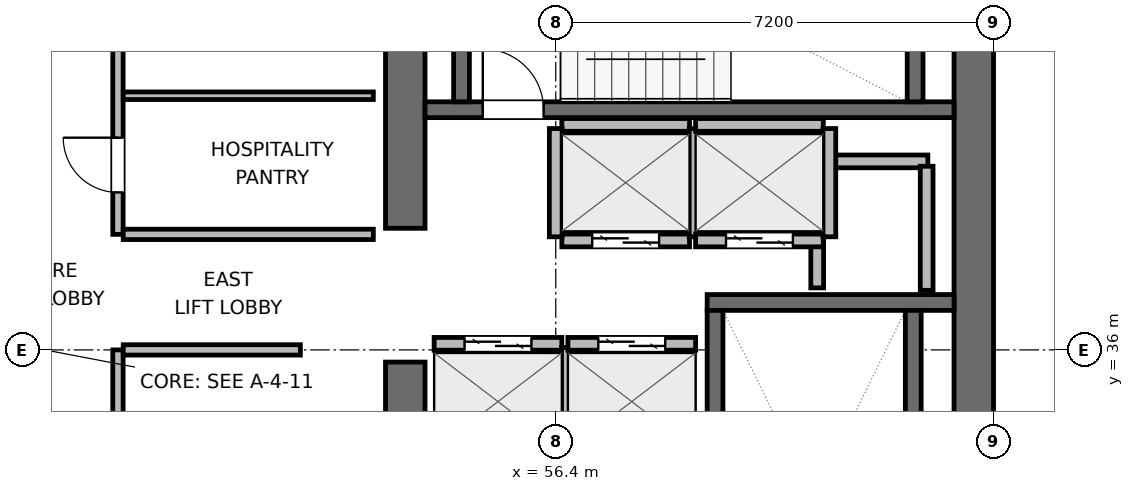
"""IFC4 building model, lengths in metres.
Left out: names, types, materials, properties, quantities, classifications, styles, units other than length and angle.
Written with IfcOpenShell. Run it as: python <this file> out.ifc"""

import sys

from ifc_helpers import new_model, si_unit, direction, frame, frame_2d, origin, place, context, subcontext, project, spatial, rectangle, extrude, element, fill, save


model = new_model("IFC4")
c1 = context("Model", 3, precision=1e-05, world=origin(), true_north=direction((0.0, 1.0)))
c2 = subcontext(c1, "Body", "Model", "MODEL_VIEW")
j1 = project(units=[si_unit("LENGTHUNIT", "METRE"), si_unit("PLANEANGLEUNIT", "RADIAN")], contexts=[c1])
p1 = place(None, origin())
s1 = spatial("IfcSite", under=j1, at=p1, CompositionType="ELEMENT")
p2 = place(p1, origin())
s2 = spatial("IfcBuilding", under=s1, at=p2, CompositionType="ELEMENT")
p3 = place(p2, frame((0.0, 0.0, 223.2)))
s3 = spatial("IfcBuildingStorey", under=s2, at=p3, CompositionType="ELEMENT", Elevation=223.2)
p4 = place(p3, frame((53.925, 27.925, 0.0), z_axis=(0.0, 0.0, 1.0), x_axis=(0.0, 1.0, 0.0)))
e1 = element("IfcWall", 1, at=p4, inside=s3, PredefinedType="SHEAR", context=c2, shape_type="SweptSolid", body=[
    extrude(rectangle(XDim=7.875, YDim=0.65, at=frame_2d((3.938, 0.0))), origin(), (0.0, 0.0, 1.0), 3.9),
])
p5 = place(p3, frame((53.925, 38.0, 0.0), z_axis=(0.0, 0.0, 1.0), x_axis=(0.0, 1.0, 0.0)))
e2 = element("IfcWall", 2, at=p5, inside=s3, PredefinedType="SHEAR", context=c2, shape_type="SweptSolid", body=[
    extrude(rectangle(XDim=6.075, YDim=0.65, at=frame_2d((3.038, 0.0))), origin(), (0.0, 0.0, 1.0), 3.9),
])
p6 = place(p3, frame((63.275, 27.6, 0.0), z_axis=(0.0, 0.0, 1.0), x_axis=(0.0, 1.0, 0.0)))
e3 = element("IfcWall", 3, at=p6, inside=s3, PredefinedType="SHEAR", context=c2, shape_type="SweptSolid", body=[
    extrude(rectangle(XDim=16.8, YDim=0.65, at=frame_2d((8.4, 0.0))), origin(), (0.0, 0.0, 1.0), 3.9),
])
p7 = place(p3, frame((58.89, 36.78, 0.0), z_axis=(0.0, 0.0, 1.0), x_axis=(1.0, 0.0, 0.0)))
e4 = element("IfcWall", 4, at=p7, inside=s3, PredefinedType="SHEAR", context=c2, shape_type="SweptSolid", body=[
    extrude(rectangle(XDim=4.06, YDim=0.26, at=frame_2d((2.03, 0.0))), origin(), (0.0, 0.0, 1.0), 3.9),
])
p8 = place(p3, frame((59.02, 29.05, 0.0), z_axis=(0.0, 0.0, 1.0), x_axis=(0.0, 1.0, 0.0)))
e5 = element("IfcWall", 5, at=p8, inside=s3, PredefinedType="SHEAR", context=c2, shape_type="SweptSolid", body=[
    extrude(rectangle(XDim=7.6, YDim=0.26, at=frame_2d((3.8, 0.0))), origin(), (0.0, 0.0, 1.0), 3.9),
])
p9 = place(p8, frame((0.3, 0.0, 0.0)))
e6 = element("IfcOpeningElement", 6, at=p9, cuts=e5, PredefinedType="OPENING", context=c2, shape_type="SweptSolid", body=[
    extrude(rectangle(XDim=1.0, YDim=2.04, at=frame_2d((0.5, 1.02))), frame((0.0, 0.14, 0.0), z_axis=(0.0, -1.0, 0.0), x_axis=(1.0, 0.0, 0.0)), (0.0, 0.0, 1.0), 0.28),
])
p10 = place(p3, frame((62.28, 29.05, 0.0), z_axis=(0.0, 0.0, 1.0), x_axis=(0.0, 1.0, 0.0)))
e7 = element("IfcWall", 7, at=p10, inside=s3, PredefinedType="SHEAR", context=c2, shape_type="SweptSolid", body=[
    extrude(rectangle(XDim=7.6, YDim=0.26, at=frame_2d((3.8, 0.0))), origin(), (0.0, 0.0, 1.0), 3.9),
])
p11 = place(p3, frame((54.25, 39.95, 0.0), z_axis=(0.0, 0.0, 1.0), x_axis=(1.0, 0.0, 0.0)))
e8 = element("IfcWall", 8, at=p11, inside=s3, PredefinedType="SHEAR", context=c2, shape_type="SweptSolid", body=[
    extrude(rectangle(XDim=8.7, YDim=0.26, at=frame_2d((4.35, 0.0))), origin(), (0.0, 0.0, 1.0), 3.9),
])
p12 = place(p11, frame((0.95, 0.0, 0.0)))
e9 = element("IfcOpeningElement", 9, at=p12, cuts=e8, PredefinedType="OPENING", context=c2, shape_type="SweptSolid", body=[
    extrude(rectangle(XDim=1.0, YDim=2.04, at=frame_2d((0.5, 1.02))), frame((0.0, 0.14, 0.0), z_axis=(0.0, -1.0, 0.0), x_axis=(1.0, 0.0, 0.0)), (0.0, 0.0, 1.0), 0.28),
])
for number, where, z_axis, x_axis in (
    (10, (54.85, 40.08, 0.0), (0.0, 0.0, 1.0), (0.0, 1.0, 0.0)),
    (11, (62.31, 40.08, 0.0), (0.0, 0.0, 1.0), (0.0, 1.0, 0.0)),
):
    element("IfcWall", number, at=place(p3, frame(where, z_axis=z_axis, x_axis=x_axis)), inside=s3, PredefinedType="SHEAR", context=c2, shape_type="SweptSolid", body=[
        extrude(rectangle(XDim=2.94, YDim=0.26, at=frame_2d((1.47, 0.0))), origin(), (0.0, 0.0, 1.0), 3.9),
    ])
p13 = place(p3, frame((60.72, 39.1, 0.0), z_axis=(0.0, 0.0, 1.0), x_axis=(1.0, 0.0, 0.0)))
e12 = element("IfcWall", 12, at=p13, inside=s3, PredefinedType="PARTITIONING", context=c2, shape_type="SweptSolid", body=[
    extrude(rectangle(XDim=1.8, YDim=0.21, at=frame_2d((0.9, 0.0))), origin(), (0.0, 0.0, 1.0), 3.68),
])
p14 = place(p3, frame((60.7, 37.02, 0.0), z_axis=(0.0, 0.0, 1.0), x_axis=(0.0, 1.0, 0.0)))
e13 = element("IfcWall", 13, at=p14, inside=s3, PredefinedType="PARTITIONING", context=c2, shape_type="SweptSolid", body=[
    extrude(rectangle(XDim=1.96, YDim=0.21, at=frame_2d((0.98, 0.0))), origin(), (0.0, 0.0, 1.0), 3.68),
])
p15 = place(p3, frame((62.5, 36.98, 0.0), z_axis=(0.0, 0.0, 1.0), x_axis=(0.0, 1.0, 0.0)))
e14 = element("IfcWall", 14, at=p15, inside=s3, PredefinedType="PARTITIONING", context=c2, shape_type="SweptSolid", body=[
    extrude(rectangle(XDim=2.04, YDim=0.21, at=frame_2d((1.02, 0.0))), origin(), (0.0, 0.0, 1.0), 3.68),
])
p16 = place(p3, frame((54.4, 36.1, 0.0), z_axis=(0.0, 0.0, 1.0), x_axis=(1.0, 0.0, 0.0)))
e15 = element("IfcWall", 15, at=p16, inside=s3, PredefinedType="PARTITIONING", context=c2, shape_type="SweptSolid", body=[
    extrude(rectangle(XDim=2.1, YDim=0.21, at=frame_2d((1.05, 0.0))), origin(), (0.0, 0.0, 1.0), 3.68),
])
p17 = place(p16, frame((0.5, 0.0, 0.0)))
e16 = element("IfcOpeningElement", 16, at=p17, cuts=e15, PredefinedType="OPENING", context=c2, shape_type="SweptSolid", body=[
    extrude(rectangle(XDim=1.1, YDim=2.04, at=frame_2d((0.55, 1.02))), frame((0.0, 0.115, 0.0), z_axis=(0.0, -1.0, 0.0), x_axis=(1.0, 0.0, 0.0)), (0.0, 0.0, 1.0), 0.23),
])
p18 = place(p3, frame((56.6, 34.26, 0.0), z_axis=(0.0, 0.0, 1.0), x_axis=(0.0, 1.0, 0.0)))
e17 = element("IfcWall", 17, at=p18, inside=s3, PredefinedType="PARTITIONING", context=c2, shape_type="SweptSolid", body=[
    extrude(rectangle(XDim=1.78, YDim=0.21, at=frame_2d((0.89, 0.0))), origin(), (0.0, 0.0, 1.0), 3.68),
])
p19 = place(p3, frame((56.6, 36.1, 0.0), z_axis=(0.0, 0.0, 1.0), x_axis=(1.0, 0.0, 0.0)))
e18 = element("IfcWall", 18, at=p19, inside=s3, PredefinedType="PARTITIONING", context=c2, shape_type="SweptSolid", body=[
    extrude(rectangle(XDim=2.1, YDim=0.21, at=frame_2d((1.05, 0.0))), origin(), (0.0, 0.0, 1.0), 3.68),
])
p20 = place(p19, frame((0.5, 0.0, 0.0)))
e19 = element("IfcOpeningElement", 19, at=p20, cuts=e18, PredefinedType="OPENING", context=c2, shape_type="SweptSolid", body=[
    extrude(rectangle(XDim=1.1, YDim=2.04, at=frame_2d((0.55, 1.02))), frame((0.0, 0.115, 0.0), z_axis=(0.0, -1.0, 0.0), x_axis=(1.0, 0.0, 0.0)), (0.0, 0.0, 1.0), 0.23),
])
p21 = place(p3, frame((56.5, 37.8, 0.0), z_axis=(0.0, 0.0, 1.0), x_axis=(1.0, 0.0, 0.0)))
e20 = element("IfcWall", 20, at=p21, inside=s3, PredefinedType="PARTITIONING", context=c2, shape_type="SweptSolid", body=[
    extrude(rectangle(XDim=2.1, YDim=0.21, at=frame_2d((1.05, 0.0))), origin(), (0.0, 0.0, 1.0), 3.68),
])
p22 = place(p21, frame((0.5, 0.0, 0.0)))
e21 = element("IfcOpeningElement", 21, at=p22, cuts=e20, PredefinedType="OPENING", context=c2, shape_type="SweptSolid", body=[
    extrude(rectangle(XDim=1.1, YDim=2.04, at=frame_2d((0.55, 1.02))), frame((0.0, 0.115, 0.0), z_axis=(0.0, -1.0, 0.0), x_axis=(1.0, 0.0, 0.0)), (0.0, 0.0, 1.0), 0.23),
])
p23 = place(p3, frame((56.5, 39.7, 0.0), z_axis=(0.0, 0.0, 1.0), x_axis=(1.0, 0.0, 0.0)))
e22 = element("IfcWall", 22, at=p23, inside=s3, PredefinedType="PARTITIONING", context=c2, shape_type="SweptSolid", body=[
    extrude(rectangle(XDim=2.1, YDim=0.21, at=frame_2d((1.05, 0.0))), origin(), (0.0, 0.0, 1.0), 3.68),
])
for number, where, z_axis, x_axis in (
    (23, (56.4, 37.86, 0.0), (0.0, 0.0, 1.0), (0.0, 1.0, 0.0)),
    (24, (58.7, 37.86, 0.0), (0.0, 0.0, 1.0), (0.0, 1.0, 0.0)),
):
    element("IfcWall", number, at=place(p3, frame(where, z_axis=z_axis, x_axis=x_axis)), inside=s3, PredefinedType="PARTITIONING", context=c2, shape_type="SweptSolid", body=[
        extrude(rectangle(XDim=1.78, YDim=0.21, at=frame_2d((0.89, 0.0))), origin(), (0.0, 0.0, 1.0), 3.68),
    ])
p24 = place(p3, frame((58.7, 37.8, 0.0), z_axis=(0.0, 0.0, 1.0), x_axis=(1.0, 0.0, 0.0)))
e25 = element("IfcWall", 25, at=p24, inside=s3, PredefinedType="PARTITIONING", context=c2, shape_type="SweptSolid", body=[
    extrude(rectangle(XDim=2.1, YDim=0.21, at=frame_2d((1.05, 0.0))), origin(), (0.0, 0.0, 1.0), 3.68),
])
p25 = place(p24, frame((0.5, 0.0, 0.0)))
e26 = element("IfcOpeningElement", 26, at=p25, cuts=e25, PredefinedType="OPENING", context=c2, shape_type="SweptSolid", body=[
    extrude(rectangle(XDim=1.1, YDim=2.04, at=frame_2d((0.55, 1.02))), frame((0.0, 0.115, 0.0), z_axis=(0.0, -1.0, 0.0), x_axis=(1.0, 0.0, 0.0)), (0.0, 0.0, 1.0), 0.23),
])
p26 = place(p3, frame((58.7, 39.7, 0.0), z_axis=(0.0, 0.0, 1.0), x_axis=(1.0, 0.0, 0.0)))
e27 = element("IfcWall", 27, at=p26, inside=s3, PredefinedType="PARTITIONING", context=c2, shape_type="SweptSolid", body=[
    extrude(rectangle(XDim=2.1, YDim=0.21, at=frame_2d((1.05, 0.0))), origin(), (0.0, 0.0, 1.0), 3.68),
])
p27 = place(p3, frame((60.9, 37.86, 0.0), z_axis=(0.0, 0.0, 1.0), x_axis=(0.0, 1.0, 0.0)))
e28 = element("IfcWall", 28, at=p27, inside=s3, PredefinedType="PARTITIONING", context=c2, shape_type="SweptSolid", body=[
    extrude(rectangle(XDim=1.78, YDim=0.21, at=frame_2d((0.89, 0.0))), origin(), (0.0, 0.0, 1.0), 3.68),
])
p28 = place(p3, frame((49.2, 32.6, 0.0), z_axis=(0.0, 0.0, 1.0), x_axis=(0.0, 1.0, 0.0)))
e29 = element("IfcWall", 29, at=p28, inside=s3, PredefinedType="PARTITIONING", context=c2, shape_type="SweptSolid", body=[
    extrude(rectangle(XDim=3.4, YDim=0.17, at=frame_2d((1.7, 0.0))), origin(), (0.0, 0.0, 1.0), 3.68),
])
p29 = place(p28, frame((0.638, 0.0, 0.0)))
e30 = element("IfcOpeningElement", 30, at=p29, cuts=e29, PredefinedType="OPENING", context=c2, shape_type="SweptSolid", body=[
    extrude(rectangle(XDim=0.9, YDim=2.02, at=frame_2d((0.45, 1.01))), frame((0.0, 0.095, 0.0), z_axis=(0.0, -1.0, 0.0), x_axis=(1.0, 0.0, 0.0)), (0.0, 0.0, 1.0), 0.19),
])
p30 = place(p3, frame((49.287, 36.0, 0.0), z_axis=(0.0, 0.0, 1.0), x_axis=(1.0, 0.0, 0.0)))
e31 = element("IfcWall", 31, at=p30, inside=s3, PredefinedType="PARTITIONING", context=c2, shape_type="SweptSolid", body=[
    extrude(rectangle(XDim=2.913, YDim=0.17, at=frame_2d((1.457, 0.0))), origin(), (0.0, 0.0, 1.0), 3.68),
])
p31 = place(p3, frame((49.2, 37.9, 0.0), z_axis=(0.0, 0.0, 1.0), x_axis=(0.0, 1.0, 0.0)))
e32 = element("IfcWall", 32, at=p31, inside=s3, PredefinedType="PARTITIONING", context=c2, shape_type="SweptSolid", body=[
    extrude(rectangle(XDim=6.0, YDim=0.17, at=frame_2d((3.0, 0.0))), origin(), (0.0, 0.0, 1.0), 3.68),
])
p32 = place(p31, frame((0.69, 0.0, 0.0)))
e33 = element("IfcOpeningElement", 33, at=p32, cuts=e32, PredefinedType="OPENING", context=c2, shape_type="SweptSolid", body=[
    extrude(rectangle(XDim=0.9, YDim=2.02, at=frame_2d((0.45, 1.01))), frame((0.0, 0.095, 0.0), z_axis=(0.0, -1.0, 0.0), x_axis=(1.0, 0.0, 0.0)), (0.0, 0.0, 1.0), 0.19),
])
p33 = place(p31, frame((3.69, 0.0, 0.0)))
e34 = element("IfcOpeningElement", 34, at=p33, cuts=e32, PredefinedType="OPENING", context=c2, shape_type="SweptSolid", body=[
    extrude(rectangle(XDim=0.9, YDim=2.02, at=frame_2d((0.45, 1.01))), frame((0.0, 0.095, 0.0), z_axis=(0.0, -1.0, 0.0), x_axis=(1.0, 0.0, 0.0)), (0.0, 0.0, 1.0), 0.19),
])
p34 = place(p3, frame((49.287, 37.9, 0.0), z_axis=(0.0, 0.0, 1.0), x_axis=(1.0, 0.0, 0.0)))
e35 = element("IfcWall", 35, at=p34, inside=s3, PredefinedType="PARTITIONING", context=c2, shape_type="SweptSolid", body=[
    extrude(rectangle(XDim=4.113, YDim=0.17, at=frame_2d((2.056, 0.0))), origin(), (0.0, 0.0, 1.0), 3.68),
])
p35 = place(p3, frame((49.287, 40.18, 0.0), z_axis=(0.0, 0.0, 1.0), x_axis=(1.0, 0.0, 0.0)))
e36 = element("IfcWall", 36, at=p35, inside=s3, PredefinedType="PARTITIONING", context=c2, shape_type="SweptSolid", body=[
    extrude(rectangle(XDim=4.113, YDim=0.125, at=frame_2d((2.056, 0.0))), origin(), (0.0, 0.0, 1.0), 3.68),
])
p36 = place(p12, origin())
e37 = element("IfcDoor", 37, at=p36, inside=s3, OperationType="SINGLE_SWING_LEFT", PredefinedType="DOOR", context=c2, shape_type="SweptSolid", body=[
    extrude(rectangle(XDim=1.0, YDim=2.04, at=frame_2d((0.5, 1.02))), frame((0.0, 0.025, 0.0), z_axis=(0.0, -1.0, 0.0), x_axis=(1.0, 0.0, 0.0)), (0.0, 0.0, 1.0), 0.05),
])
fill(e9, e37)
p37 = place(p17, origin())
e38 = element("IfcDoor", 38, at=p37, inside=s3, OperationType="DOUBLE_DOOR_SLIDING", PredefinedType="DOOR", context=c2, shape_type="SweptSolid", body=[
    extrude(rectangle(XDim=1.1, YDim=2.04, at=frame_2d((0.55, 1.02))), frame((0.0, 0.025, 0.0), z_axis=(0.0, -1.0, 0.0), x_axis=(1.0, 0.0, 0.0)), (0.0, 0.0, 1.0), 0.05),
])
fill(e16, e38)
p38 = place(p20, origin())
e39 = element("IfcDoor", 39, at=p38, inside=s3, OperationType="DOUBLE_DOOR_SLIDING", PredefinedType="DOOR", context=c2, shape_type="SweptSolid", body=[
    extrude(rectangle(XDim=1.1, YDim=2.04, at=frame_2d((0.55, 1.02))), frame((0.0, 0.025, 0.0), z_axis=(0.0, -1.0, 0.0), x_axis=(1.0, 0.0, 0.0)), (0.0, 0.0, 1.0), 0.05),
])
fill(e19, e39)
p39 = place(p22, origin())
e40 = element("IfcDoor", 40, at=p39, inside=s3, OperationType="DOUBLE_DOOR_SLIDING", PredefinedType="DOOR", context=c2, shape_type="SweptSolid", body=[
    extrude(rectangle(XDim=1.1, YDim=2.04, at=frame_2d((0.55, 1.02))), frame((0.0, 0.025, 0.0), z_axis=(0.0, -1.0, 0.0), x_axis=(1.0, 0.0, 0.0)), (0.0, 0.0, 1.0), 0.05),
])
fill(e21, e40)
p40 = place(p25, origin())
e41 = element("IfcDoor", 41, at=p40, inside=s3, OperationType="DOUBLE_DOOR_SLIDING", PredefinedType="DOOR", context=c2, shape_type="SweptSolid", body=[
    extrude(rectangle(XDim=1.1, YDim=2.04, at=frame_2d((0.55, 1.02))), frame((0.0, 0.025, 0.0), z_axis=(0.0, -1.0, 0.0), x_axis=(1.0, 0.0, 0.0)), (0.0, 0.0, 1.0), 0.05),
])
fill(e26, e41)
p41 = place(p32, origin())
e42 = element("IfcDoor", 42, at=p41, inside=s3, OperationType="SINGLE_SWING_RIGHT", PredefinedType="DOOR", context=c2, shape_type="SweptSolid", body=[
    extrude(rectangle(XDim=0.9, YDim=2.02, at=frame_2d((0.45, 1.01))), frame((0.0, 0.025, 0.0), z_axis=(0.0, -1.0, 0.0), x_axis=(1.0, 0.0, 0.0)), (0.0, 0.0, 1.0), 0.05),
])
fill(e33, e42)
save(model, sys.argv[1])
